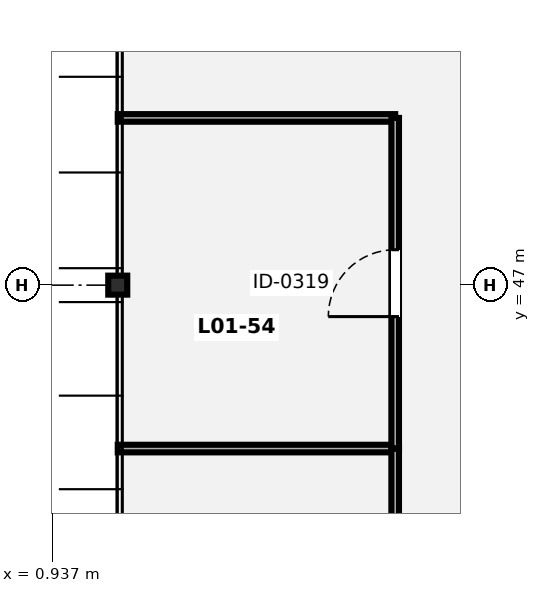
"""IFC4 building model, lengths in metres.
Left out: names, types, materials, properties, quantities, classifications, styles, units other than length and angle.
Written with IfcOpenShell. Run it as: python <this file> out.ifc"""

import sys

from ifc_helpers import new_model, si_unit, direction, frame, frame_2d, origin, origin_2d, place, context, subcontext, project, spatial, rectangle, hollow_rectangle, extrude, element, fill, save


model = new_model("IFC4")
c1 = context("Model", 3, precision=1e-05, world=origin(), true_north=direction((0.0, 1.0)))
c2 = subcontext(c1, "Body", "Model", "MODEL_VIEW")
j1 = project(units=[si_unit("LENGTHUNIT", "METRE"), si_unit("PLANEANGLEUNIT", "RADIAN")], contexts=[c1])
p1 = place(None, origin())
s1 = spatial("IfcSite", under=j1, at=p1, CompositionType="ELEMENT")
p2 = place(p1, origin())
s2 = spatial("IfcBuilding", under=s1, at=p2, CompositionType="ELEMENT")
p3 = place(p2, frame((0.0, 0.0, 4.9)))
s3 = spatial("IfcBuildingStorey", under=s2, at=p3, CompositionType="ELEMENT", Elevation=4.9)
p4 = place(p3, frame((1.8, 47.0, 0.0), z_axis=(0.0, 0.0, 1.0), x_axis=(1.0, 0.0, 0.0)))
e1 = element("IfcColumn", 1, at=p4, inside=s3, PredefinedType="COLUMN", context=c2, shape_type="SweptSolid", body=[
    extrude(hollow_rectangle(XDim=0.25, YDim=0.25, WallThickness=0.012, at=origin_2d()), origin(), (0.0, 0.0, 1.0), 4.2),
])
p5 = place(p3, frame((1.8, 44.85, 0.0), z_axis=(0.0, 0.0, 1.0), x_axis=(1.0, 0.0, 0.0)))
e2 = element("IfcWall", 2, at=p5, inside=s3, PredefinedType="PARTITIONING", context=c2, shape_type="SweptSolid", body=[
    extrude(rectangle(XDim=3.65, YDim=0.1, at=frame_2d((1.825, 0.0))), origin(), (0.0, 0.0, 1.0), 4.0),
])
p6 = place(p3, frame((5.45, 41.6, 0.0), z_axis=(0.0, 0.0, 1.0), x_axis=(0.0, 1.0, 0.0)))
e3 = element("IfcWall", 3, at=p6, inside=s3, PredefinedType="PARTITIONING", context=c2, shape_type="SweptSolid", body=[
    extrude(rectangle(XDim=3.25, YDim=0.1, at=frame_2d((1.625, 0.0))), origin(), (0.0, 0.0, 1.0), 4.0),
])
p7 = place(p6, frame((1.125, 0.0, 0.0)))
e4 = element("IfcOpeningElement", 4, at=p7, cuts=e3, PredefinedType="OPENING", context=c2, shape_type="SweptSolid", body=[
    extrude(rectangle(XDim=1.0, YDim=2.1, at=frame_2d((0.5, 1.05))), frame((0.0, 0.06, 0.0), z_axis=(0.0, -1.0, 0.0), x_axis=(1.0, 0.0, 0.0)), (0.0, 0.0, 1.0), 0.12),
])
p8 = place(p3, frame((1.8, 49.2, 0.0), z_axis=(0.0, 0.0, 1.0), x_axis=(1.0, 0.0, 0.0)))
e5 = element("IfcWall", 5, at=p8, inside=s3, PredefinedType="PARTITIONING", context=c2, shape_type="SweptSolid", body=[
    extrude(rectangle(XDim=3.65, YDim=0.1, at=frame_2d((1.825, 0.0))), origin(), (0.0, 0.0, 1.0), 4.0),
])
p9 = place(p3, frame((5.45, 44.852, 0.0), z_axis=(0.0, 0.0, 1.0), x_axis=(0.0, 1.0, 0.0)))
e6 = element("IfcWall", 6, at=p9, inside=s3, PredefinedType="PARTITIONING", context=c2, shape_type="SweptSolid", body=[
    extrude(rectangle(XDim=4.348, YDim=0.1, at=frame_2d((2.174, 0.0))), origin(), (0.0, 0.0, 1.0), 4.0),
])
p10 = place(p9, frame((1.734, 0.0, 0.0)))
e7 = element("IfcOpeningElement", 7, at=p10, cuts=e6, PredefinedType="OPENING", context=c2, shape_type="SweptSolid", body=[
    extrude(rectangle(XDim=0.88, YDim=2.08, at=frame_2d((0.44, 1.04))), frame((0.0, 0.06, 0.0), z_axis=(0.0, -1.0, 0.0), x_axis=(1.0, 0.0, 0.0)), (0.0, 0.0, 1.0), 0.12),
])
p11 = place(p10, origin())
e8 = element("IfcDoor", 8, at=p11, inside=s3, OperationType="SINGLE_SWING_LEFT", PredefinedType="DOOR", context=c2, shape_type="SweptSolid", body=[
    extrude(rectangle(XDim=0.88, YDim=2.08, at=frame_2d((0.44, 1.04))), frame((0.0, 0.025, 0.0), z_axis=(0.0, -1.0, 0.0), x_axis=(1.0, 0.0, 0.0)), (0.0, 0.0, 1.0), 0.05),
])
fill(e7, e8)
save(model, sys.argv[1])
